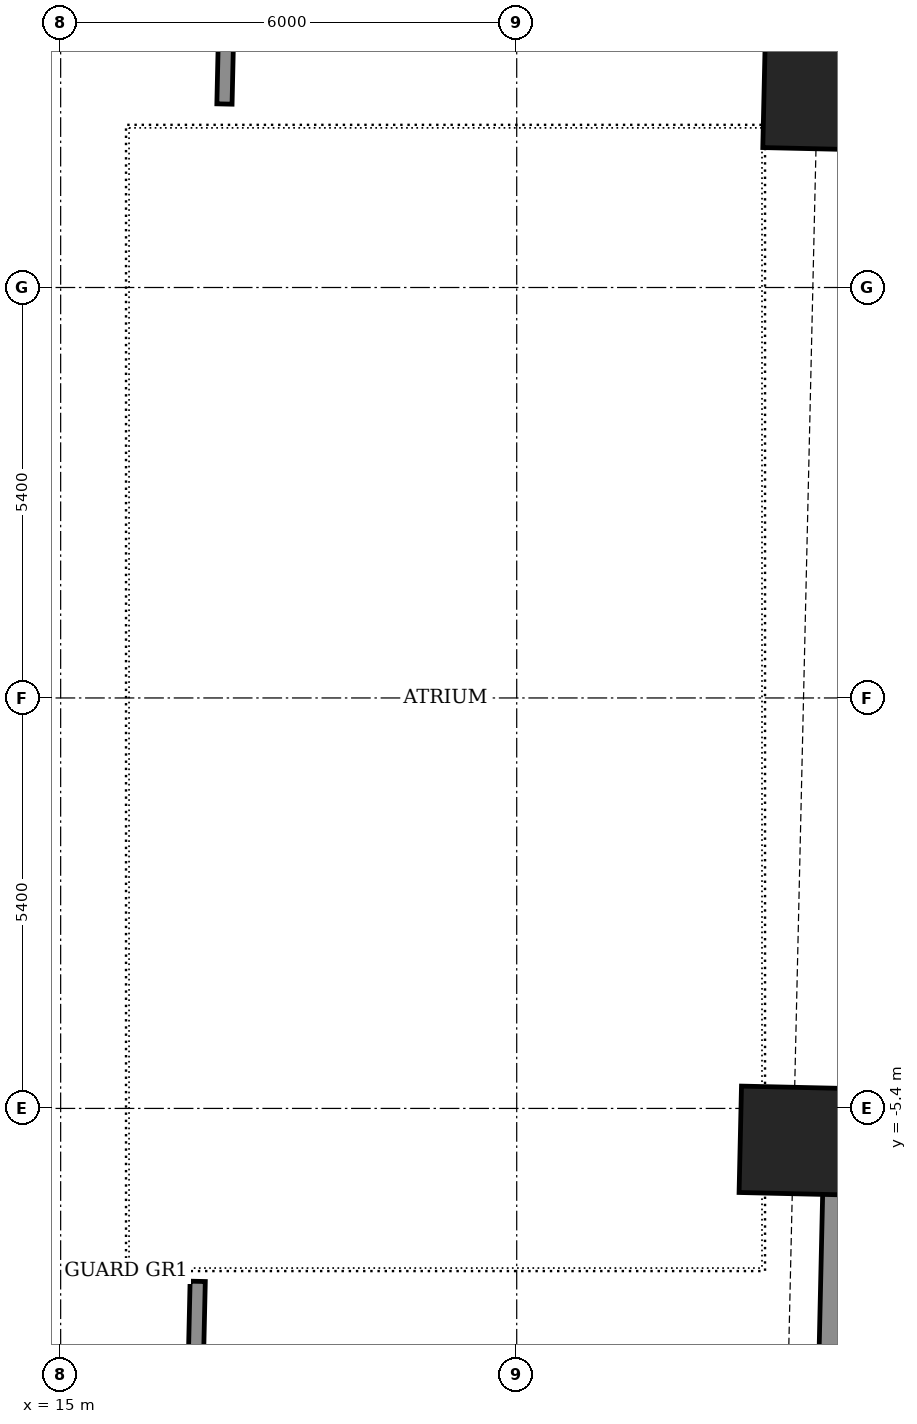
"""IFC4 building model, lengths in metres.
Left out: names, types, materials, properties, quantities, classifications, styles, units other than length and angle.
Written with IfcOpenShell. Run it as: python <this file> out.ifc"""

import sys

from ifc_helpers import new_model, si_unit, direction, frame, frame_2d, origin, origin_2d, place, context, subcontext, project, spatial, rectangle, extrude, element, save


model = new_model("IFC4")
c1 = context("Model", 3, precision=1e-05, world=origin(), true_north=direction((0.0, 1.0)))
c2 = subcontext(c1, "Body", "Model", "MODEL_VIEW")
j1 = project(units=[si_unit("LENGTHUNIT", "METRE"), si_unit("PLANEANGLEUNIT", "RADIAN")], contexts=[c1])
p1 = place(None, origin())
s1 = spatial("IfcSite", under=j1, at=p1, CompositionType="ELEMENT")
p2 = place(p1, origin())
s2 = spatial("IfcBuilding", under=s1, at=p2, CompositionType="ELEMENT")
p3 = place(p2, frame((0.0, 0.0, 109.1)))
s3 = spatial("IfcBuildingStorey", under=s2, at=p3, CompositionType="ELEMENT", Elevation=109.1)
for number, where, z_axis, x_axis in (
    (1, (24.641, -5.822, -0.55), (0.0, 0.0, 1.0), (0.023, 1.0, 0.0)),
    (2, (24.953, 7.925, -0.55), (0.0, 0.0, 1.0), (0.023, 1.0, 0.0)),
):
    element("IfcColumn", number, at=place(p3, frame(where, z_axis=z_axis, x_axis=x_axis)), inside=s3, PredefinedType="COLUMN", context=c2, shape_type="SweptSolid", body=[
        extrude(rectangle(XDim=1.4, YDim=1.4, at=origin_2d()), origin(), (0.0, 0.0, 1.0), 3.6),
    ])
p4 = place(p3, frame((24.915, -18.007, 0.0), z_axis=(0.0, 0.0, 1.0), x_axis=(0.02263706344, 0.999743748847, 0.0)))
e3 = element("IfcWall", 3, at=p4, inside=s3, PredefinedType="SOLIDWALL", context=c2, shape_type="SweptSolid", body=[
    extrude(rectangle(XDim=12.23, YDim=0.3, at=frame_2d((6.115, 0.0))), origin(), (0.0, 0.0, 1.0), 3.05),
])
p5 = place(p4, frame((2.213, 0.0, 0.0)))
e4 = element("IfcOpeningElement", 4, at=p5, cuts=e3, PredefinedType="OPENING", context=c2, shape_type="SweptSolid", body=[
    extrude(rectangle(XDim=1.5, YDim=2.4, at=frame_2d((0.75, 1.2))), frame((0.0, 0.16, 0.0), z_axis=(0.0, -1.0, 0.0), x_axis=(1.0, 0.0, 0.0)), (0.0, 0.0, 1.0), 0.32),
])
p6 = place(p4, frame((7.027, 0.0, 0.9)))
e5 = element("IfcOpeningElement", 5, at=p6, cuts=e3, PredefinedType="OPENING", context=c2, shape_type="SweptSolid", body=[
    extrude(rectangle(XDim=2.4, YDim=1.5, at=frame_2d((1.2, 0.75))), frame((0.0, 0.16, 0.0), z_axis=(0.0, -1.0, 0.0), x_axis=(1.0, 0.0, 0.0)), (0.0, 0.0, 1.0), 0.32),
])
p7 = place(p3, frame((16.684, -12.919, 0.0), z_axis=(0.0, 0.0, 1.0), x_axis=(0.022667483124, 0.999743059595, 0.0)))
e6 = element("IfcWall", 6, at=p7, inside=s3, PredefinedType="PARTITIONING", context=c2, shape_type="SweptSolid", body=[
    extrude(rectangle(XDim=5.245, YDim=0.2, at=frame_2d((2.623, 0.0))), origin(), (0.0, 0.0, 1.0), 3.05),
])
p8 = place(p3, frame((17.155, 7.814, 0.0), z_axis=(0.0, 0.0, 1.0), x_axis=(0.022578158225, 0.999745080894, 0.0)))
e7 = element("IfcWall", 7, at=p8, inside=s3, PredefinedType="PARTITIONING", context=c2, shape_type="SweptSolid", body=[
    extrude(rectangle(XDim=4.336, YDim=0.2, at=frame_2d((2.168, 0.0))), origin(), (0.0, 0.0, 1.0), 3.05),
])
save(model, sys.argv[1])
